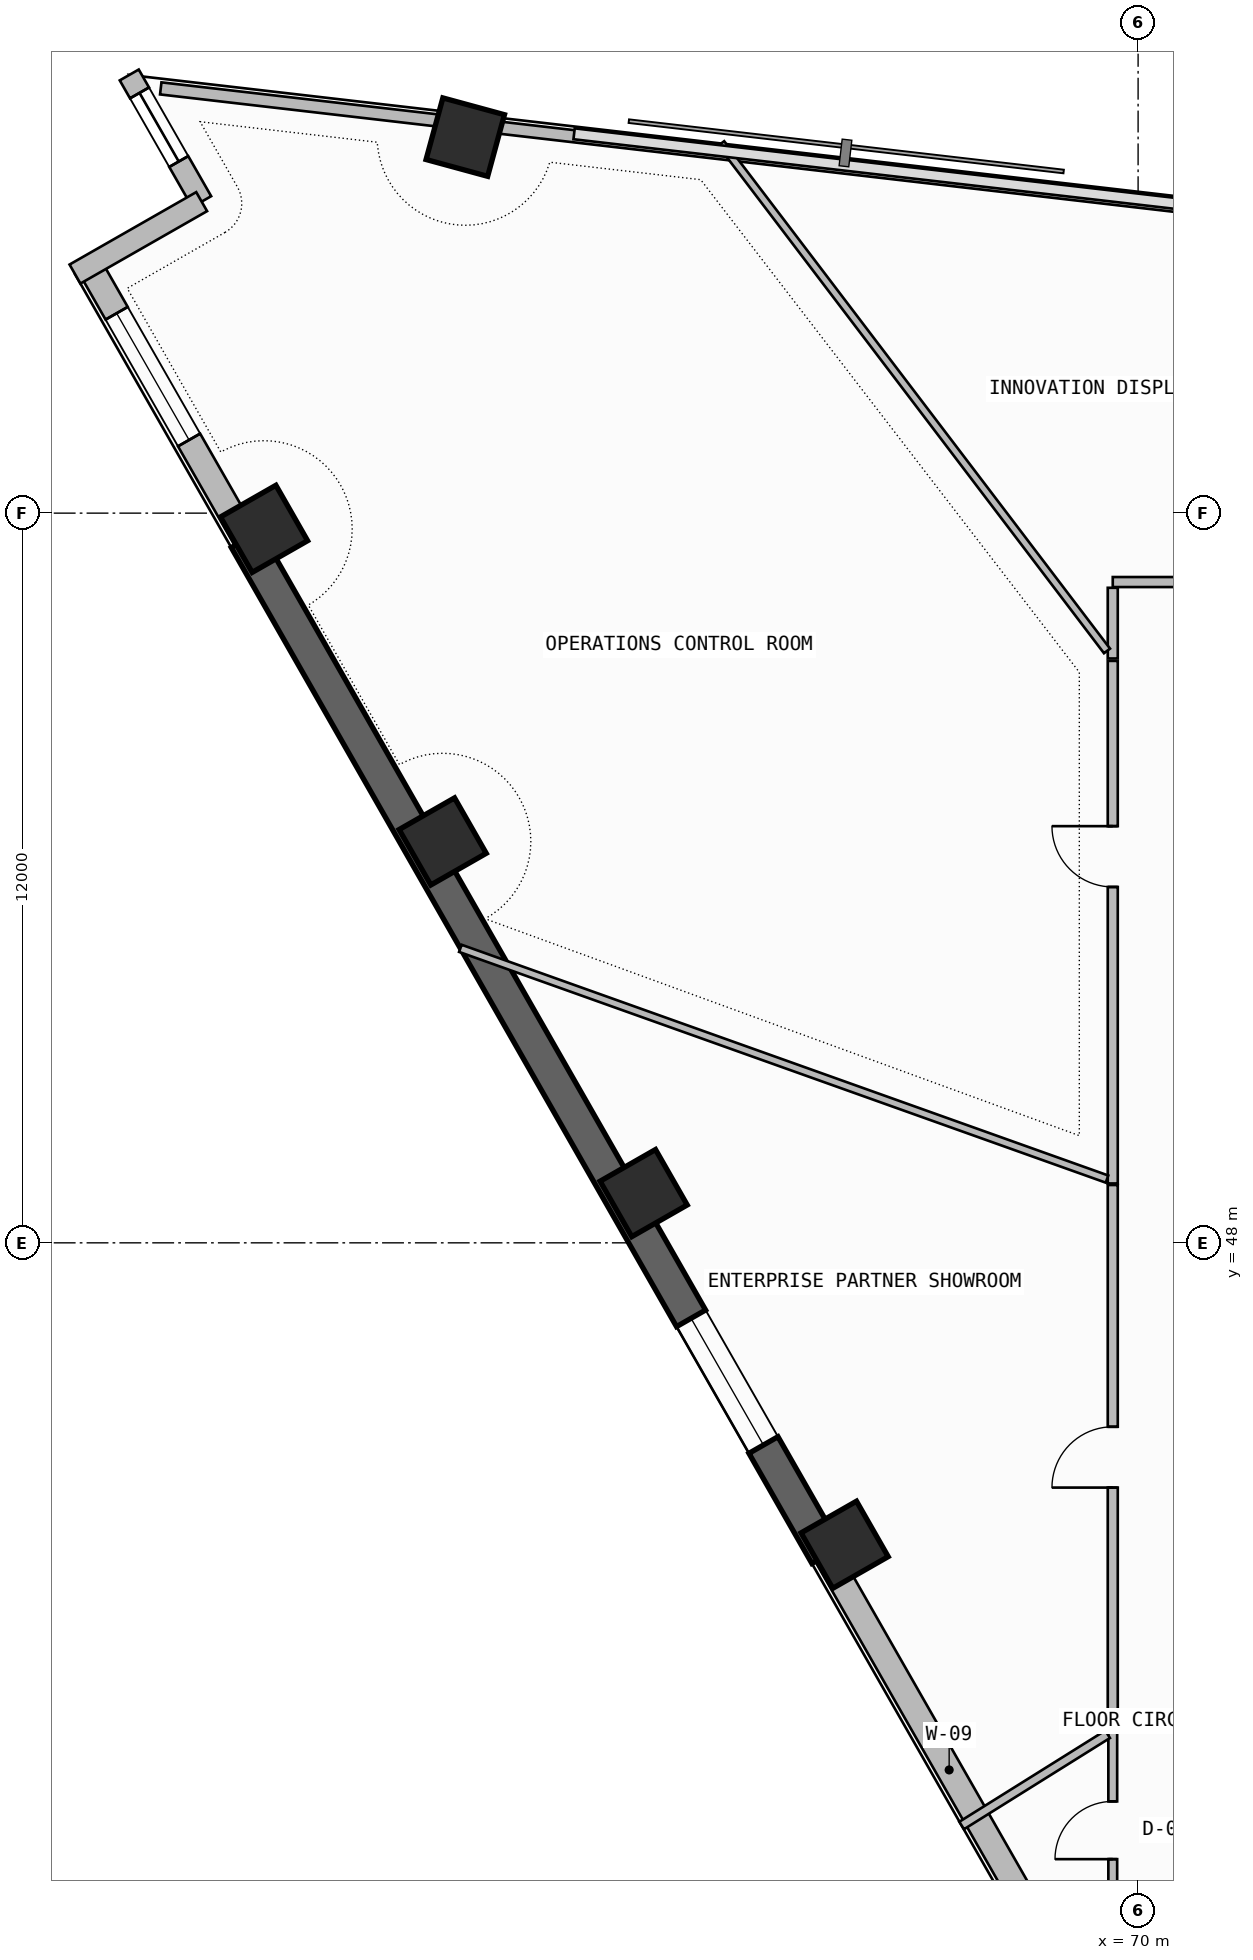
"""IFC4 building model, lengths in metres.
Left out: names, types, materials, properties, quantities, classifications, styles, units other than length and angle.
Written with IfcOpenShell. Run it as: python <this file> out.ifc"""

import sys

from ifc_helpers import new_model, si_unit, direction, frame, frame_2d, origin, origin_2d, place, context, subcontext, project, spatial, rectangle, extrude, element, fill, save


model = new_model("IFC4")
c1 = context("Model", 3, precision=1e-05, world=origin(), true_north=direction((0.0, 1.0)))
c2 = subcontext(c1, "Body", "Model", "MODEL_VIEW")
j1 = project(units=[si_unit("LENGTHUNIT", "METRE"), si_unit("PLANEANGLEUNIT", "RADIAN")], contexts=[c1])
p1 = place(None, origin())
s1 = spatial("IfcSite", under=j1, at=p1, CompositionType="ELEMENT")
p2 = place(p1, origin())
s2 = spatial("IfcBuilding", under=s1, at=p2, CompositionType="ELEMENT")
p3 = place(p2, frame((0.0, 0.0, 204.42)))
s3 = spatial("IfcBuildingStorey", under=s2, at=p3, CompositionType="ELEMENT", Elevation=204.42)
for number, where, z_axis, x_axis in (
    (1, (58.934, 66.184, 0.0), (0.0, 0.0, 1.0), (0.263, 0.965, 0.0)),
    (2, (55.625, 59.742, 0.0), (0.0, 0.0, 1.0), (-0.496, 0.868, 0.0)),
    (3, (58.563, 54.601, 0.0), (0.0, 0.0, 1.0), (-0.496, 0.868, 0.0)),
    (4, (61.868, 48.818, 0.0), (0.0, 0.0, 1.0), (-0.496, 0.868, 0.0)),
    (5, (65.173, 43.035, 0.0), (0.0, 0.0, 1.0), (-0.496, 0.868, 0.0)),
):
    element("IfcColumn", number, at=place(p3, frame(where, z_axis=z_axis, x_axis=x_axis)), inside=s3, PredefinedType="COLUMN", context=c2, shape_type="SweptSolid", body=[
        extrude(rectangle(XDim=1.05, YDim=1.05, at=origin_2d()), origin(), (0.0, 0.0, 1.0), 3.52),
    ])
p4 = place(p3, frame((52.754, 64.068, 0.0), z_axis=(0.0, 0.0, 1.0), x_axis=(0.496209984367, -0.868202540548, 0.0)))
e6 = element("IfcWall", 6, at=p4, inside=s3, PredefinedType="SOLIDWALL", context=c2, shape_type="SweptSolid", body=[
    extrude(rectangle(XDim=5.181, YDim=0.42, at=frame_2d((2.59, 0.0))), origin(), (0.0, 0.0, 1.0), 2.645),
])
p5 = place(p4, frame((0.9, 0.0, 1.1)))
e7 = element("IfcOpeningElement", 7, at=p5, cuts=e6, PredefinedType="OPENING", context=c2, shape_type="SweptSolid", body=[
    extrude(rectangle(XDim=2.4, YDim=1.2, at=frame_2d((1.2, 0.6))), frame((0.0, 0.22, 0.0), z_axis=(0.0, -1.0, 0.0), x_axis=(1.0, 0.0, 0.0)), (0.0, 0.0, 1.0), 0.44),
])
p6 = place(p3, frame((55.325, 59.57, -0.26), z_axis=(0.0, 0.0, 1.0), x_axis=(0.496211351597, -0.868201759124, 0.0)))
e8 = element("IfcWall", 8, at=p6, inside=s3, PredefinedType="SHEAR", context=c2, shape_type="SweptSolid", body=[
    extrude(rectangle(XDim=19.243, YDim=0.55, at=frame_2d((9.622, 0.0))), origin(), (0.0, 0.0, 1.0), 3.52),
])
p7 = place(p6, frame((14.757, 0.0, 1.1)))
e9 = element("IfcOpeningElement", 9, at=p7, cuts=e8, PredefinedType="OPENING", context=c2, shape_type="SweptSolid", body=[
    extrude(rectangle(XDim=2.4, YDim=1.2, at=frame_2d((1.2, 0.6))), frame((0.0, 0.285, 0.0), z_axis=(0.0, -1.0, 0.0), x_axis=(1.0, 0.0, 0.0)), (0.0, 0.0, 1.0), 0.57),
])
p8 = place(p3, frame((64.874, 42.864, 0.0), z_axis=(0.0, 0.0, 1.0), x_axis=(0.49622043329, -0.868196568517, 0.0)))
e10 = element("IfcWall", 10, at=p8, inside=s3, PredefinedType="SOLIDWALL", context=c2, shape_type="SweptSolid", body=[
    extrude(rectangle(XDim=12.582, YDim=0.42, at=frame_2d((6.291, 0.0))), origin(), (0.0, 0.0, 1.0), 2.645),
])
p9 = place(p8, frame((8.136, 0.0, 1.1)))
e11 = element("IfcOpeningElement", 11, at=p9, cuts=e10, PredefinedType="OPENING", context=c2, shape_type="SweptSolid", body=[
    extrude(rectangle(XDim=2.4, YDim=1.2, at=frame_2d((1.2, 0.6))), frame((0.0, 0.22, 0.0), z_axis=(0.0, -1.0, 0.0), x_axis=(1.0, 0.0, 0.0)), (0.0, 0.0, 1.0), 0.44),
])
p10 = place(p3, frame((53.408, 67.206, 0.0), z_axis=(0.0, 0.0, 1.0), x_axis=(0.496292324652, -0.868155474838, 0.0)))
e12 = element("IfcWall", 12, at=p10, inside=s3, PredefinedType="SOLIDWALL", context=c2, shape_type="SweptSolid", body=[
    extrude(rectangle(XDim=2.4, YDim=0.36, at=frame_2d((1.2, 0.0))), origin(), (0.0, 0.0, 1.0), 3.26),
])
p11 = place(p10, frame((0.34, 0.0, 0.45)))
e13 = element("IfcOpeningElement", 13, at=p11, cuts=e12, PredefinedType="OPENING", context=c2, shape_type="SweptSolid", body=[
    extrude(rectangle(XDim=1.3, YDim=2.4, at=frame_2d((0.65, 1.2))), frame((0.0, 0.19, 0.0), z_axis=(0.0, -1.0, 0.0), x_axis=(1.0, 0.0, 0.0)), (0.0, 0.0, 1.0), 0.38),
])
p12 = place(p3, frame((54.599, 65.123, 0.0), z_axis=(0.0, 0.0, 1.0), x_axis=(-0.86818053093, -0.4962484919, 0.0)))
e14 = element("IfcWall", 14, at=p12, inside=s3, PredefinedType="SOLIDWALL", context=c2, shape_type="SweptSolid", body=[
    extrude(rectangle(XDim=2.4, YDim=0.36, at=frame_2d((1.2, 0.0))), origin(), (0.0, 0.0, 1.0), 3.26),
])
p13 = place(p3, frame((85.424, 63.338, 0.0), z_axis=(0.0, 0.0, 1.0), x_axis=(-0.993364714048, 0.115006716693, 0.0)))
e15 = element("IfcWall", 15, at=p13, inside=s3, PredefinedType="PARAPET", context=c2, shape_type="SweptSolid", body=[
    extrude(rectangle(XDim=26.302, YDim=0.2, at=frame_2d((13.151, 0.0))), origin(), (0.0, 0.0, 1.0), 1.15),
])
p14 = place(p3, frame((58.622, 66.441, 0.0), z_axis=(0.0, 0.0, 1.0), x_axis=(-0.993362937665, 0.115022059074, 0.0)))
e16 = element("IfcWall", 16, at=p14, inside=s3, PredefinedType="PARAPET", context=c2, shape_type="SweptSolid", body=[
    extrude(rectangle(XDim=4.727, YDim=0.2, at=frame_2d((2.364, 0.0))), origin(), (0.0, 0.0, 1.0), 1.15),
])
p15 = place(p3, frame((69.583, 39.971, 0.0), z_axis=(0.0, 0.0, 1.0), x_axis=(0.0, -1.0, 0.0)))
e17 = element("IfcWall", 17, at=p15, inside=s3, PredefinedType="PARTITIONING", context=c2, shape_type="SweptSolid", body=[
    extrude(rectangle(XDim=2.576, YDim=0.145, at=frame_2d((1.288, 0.0))), origin(), (0.0, 0.0, 1.0), 3.26),
])
p16 = place(p15, frame((1.156, 0.0, 0.0)))
e18 = element("IfcOpeningElement", 18, at=p16, cuts=e17, PredefinedType="OPENING", context=c2, shape_type="SweptSolid", body=[
    extrude(rectangle(XDim=0.95, YDim=2.15, at=frame_2d((0.475, 1.075))), frame((0.0, 0.083, 0.0), z_axis=(0.0, -1.0, 0.0), x_axis=(1.0, 0.0, 0.0)), (0.0, 0.0, 1.0), 0.165),
])
p17 = place(p3, frame((67.098, 38.418, 0.0), z_axis=(0.0, 0.0, 1.0), x_axis=(0.847983769097, 0.530022195146, 0.0)))
e19 = element("IfcWall", 19, at=p17, inside=s3, PredefinedType="PARTITIONING", context=c2, shape_type="SweptSolid", body=[
    extrude(rectangle(XDim=2.831, YDim=0.145, at=frame_2d((1.416, 0.0))), origin(), (0.0, 0.0, 1.0), 3.26),
])
p18 = place(p3, frame((77.35, 58.867, 0.0), z_axis=(0.0, 0.0, 1.0), x_axis=(-1.0, 0.0, 0.0)))
e20 = element("IfcWall", 20, at=p18, inside=s3, PredefinedType="PARTITIONING", context=c2, shape_type="SweptSolid", body=[
    extrude(rectangle(XDim=7.767, YDim=0.165, at=frame_2d((3.883, 0.0))), origin(), (0.0, 0.0, 1.0), 3.26),
])
p19 = place(p18, frame((1.601, 0.0, 0.0)))
e21 = element("IfcOpeningElement", 21, at=p19, cuts=e20, PredefinedType="OPENING", context=c2, shape_type="SweptSolid", body=[
    extrude(rectangle(XDim=1.0, YDim=2.2, at=frame_2d((0.5, 1.1))), frame((0.0, 0.093, 0.0), z_axis=(0.0, -1.0, 0.0), x_axis=(1.0, 0.0, 0.0)), (0.0, 0.0, 1.0), 0.185),
])
p20 = place(p3, frame((69.583, 58.772, 0.0), z_axis=(0.0, 0.0, 1.0), x_axis=(0.0, -1.0, 0.0)))
e22 = element("IfcWall", 22, at=p20, inside=s3, PredefinedType="PARTITIONING", context=c2, shape_type="SweptSolid", body=[
    extrude(rectangle(XDim=1.163, YDim=0.165, at=frame_2d((0.581, 0.0))), origin(), (0.0, 0.0, 1.0), 2.745),
])
p21 = place(p3, frame((69.489, 57.734, 0.0), z_axis=(0.0, 0.0, 1.0), x_axis=(-0.605299937373, 0.795997478524, 0.0)))
e23 = element("IfcWall", 23, at=p21, inside=s3, PredefinedType="PARTITIONING", context=c2, shape_type="SweptSolid", body=[
    extrude(rectangle(XDim=10.484, YDim=0.125, at=frame_2d((5.242, 0.0))), origin(), (0.0, 0.0, 1.0), 2.745),
])
p22 = place(p3, frame((69.583, 57.57, 0.0), z_axis=(0.0, 0.0, 1.0), x_axis=(0.0, -1.0, 0.0)))
e24 = element("IfcWall", 24, at=p22, inside=s3, PredefinedType="PARTITIONING", context=c2, shape_type="SweptSolid", body=[
    extrude(rectangle(XDim=8.594, YDim=0.165, at=frame_2d((4.297, 0.0))), origin(), (0.0, 0.0, 1.0), 2.745),
])
p23 = place(p22, frame((2.718, 0.0, 0.0)))
e25 = element("IfcOpeningElement", 25, at=p23, cuts=e24, PredefinedType="OPENING", context=c2, shape_type="SweptSolid", body=[
    extrude(rectangle(XDim=1.0, YDim=2.2, at=frame_2d((0.5, 1.1))), frame((0.0, 0.093, 0.0), z_axis=(0.0, -1.0, 0.0), x_axis=(1.0, 0.0, 0.0)), (0.0, 0.0, 1.0), 0.185),
])
p24 = place(p3, frame((69.489, 49.049, 0.0), z_axis=(0.0, 0.0, 1.0), x_axis=(-0.941850456262, 0.336032316956, 0.0)))
e26 = element("IfcWall", 26, at=p24, inside=s3, PredefinedType="PARTITIONING", context=c2, shape_type="SweptSolid", body=[
    extrude(rectangle(XDim=11.292, YDim=0.125, at=frame_2d((5.646, 0.0))), origin(), (0.0, 0.0, 1.0), 2.645),
])
p25 = place(p3, frame((69.583, 48.951, 0.0), z_axis=(0.0, 0.0, 1.0), x_axis=(0.0, -1.0, 0.0)))
e27 = element("IfcWall", 27, at=p25, inside=s3, PredefinedType="PARTITIONING", context=c2, shape_type="SweptSolid", body=[
    extrude(rectangle(XDim=8.952, YDim=0.165, at=frame_2d((4.476, 0.0))), origin(), (0.0, 0.0, 1.0), 2.745),
])
p26 = place(p25, frame((3.976, 0.0, 0.0)))
e28 = element("IfcOpeningElement", 28, at=p26, cuts=e27, PredefinedType="OPENING", context=c2, shape_type="SweptSolid", body=[
    extrude(rectangle(XDim=1.0, YDim=2.2, at=frame_2d((0.5, 1.1))), frame((0.0, 0.093, 0.0), z_axis=(0.0, -1.0, 0.0), x_axis=(1.0, 0.0, 0.0)), (0.0, 0.0, 1.0), 0.185),
])
p27 = place(p5, origin())
e29 = element("IfcWindow", 29, at=p27, inside=s3, PartitioningType="SINGLE_PANEL", PredefinedType="WINDOW", context=c2, shape_type="SweptSolid", body=[
    extrude(rectangle(XDim=2.4, YDim=1.2, at=frame_2d((1.2, 0.6))), frame((0.0, 0.03, 0.0), z_axis=(0.0, -1.0, 0.0), x_axis=(1.0, 0.0, 0.0)), (0.0, 0.0, 1.0), 0.06),
])
fill(e7, e29)
p28 = place(p7, origin())
e30 = element("IfcWindow", 30, at=p28, inside=s3, PartitioningType="SINGLE_PANEL", PredefinedType="WINDOW", context=c2, shape_type="SweptSolid", body=[
    extrude(rectangle(XDim=2.4, YDim=1.2, at=frame_2d((1.2, 0.6))), frame((0.0, 0.03, 0.0), z_axis=(0.0, -1.0, 0.0), x_axis=(1.0, 0.0, 0.0)), (0.0, 0.0, 1.0), 0.06),
])
fill(e9, e30)
p29 = place(p11, origin())
e31 = element("IfcWindow", 31, at=p29, inside=s3, PartitioningType="SINGLE_PANEL", PredefinedType="WINDOW", context=c2, shape_type="SweptSolid", body=[
    extrude(rectangle(XDim=1.3, YDim=2.4, at=frame_2d((0.65, 1.2))), frame((0.0, 0.03, 0.0), z_axis=(0.0, -1.0, 0.0), x_axis=(1.0, 0.0, 0.0)), (0.0, 0.0, 1.0), 0.06),
])
fill(e13, e31)
p30 = place(p16, frame((0.95, 0.0, 0.0), z_axis=(0.0, 0.0, 1.0), x_axis=(-1.0, 0.0, 0.0)))
e32 = element("IfcDoor", 32, at=p30, inside=s3, OperationType="SINGLE_SWING_LEFT", PredefinedType="DOOR", context=c2, shape_type="SweptSolid", body=[
    extrude(rectangle(XDim=0.95, YDim=2.15, at=frame_2d((0.475, 1.075))), frame((0.0, 0.025, 0.0), z_axis=(0.0, -1.0, 0.0), x_axis=(1.0, 0.0, 0.0)), (0.0, 0.0, 1.0), 0.05),
])
fill(e18, e32)
p31 = place(p23, frame((1.0, 0.0, 0.0), z_axis=(0.0, 0.0, 1.0), x_axis=(-1.0, 0.0, 0.0)))
e33 = element("IfcDoor", 33, at=p31, inside=s3, OperationType="SINGLE_SWING_RIGHT", PredefinedType="DOOR", context=c2, shape_type="SweptSolid", body=[
    extrude(rectangle(XDim=1.0, YDim=2.2, at=frame_2d((0.5, 1.1))), frame((0.0, 0.025, 0.0), z_axis=(0.0, -1.0, 0.0), x_axis=(1.0, 0.0, 0.0)), (0.0, 0.0, 1.0), 0.05),
])
fill(e25, e33)
p32 = place(p26, frame((1.0, 0.0, 0.0), z_axis=(0.0, 0.0, 1.0), x_axis=(-1.0, 0.0, 0.0)))
e34 = element("IfcDoor", 34, at=p32, inside=s3, OperationType="SINGLE_SWING_LEFT", PredefinedType="DOOR", context=c2, shape_type="SweptSolid", body=[
    extrude(rectangle(XDim=1.0, YDim=2.2, at=frame_2d((0.5, 1.1))), frame((0.0, 0.025, 0.0), z_axis=(0.0, -1.0, 0.0), x_axis=(1.0, 0.0, 0.0)), (0.0, 0.0, 1.0), 0.05),
])
fill(e28, e34)
save(model, sys.argv[1])
